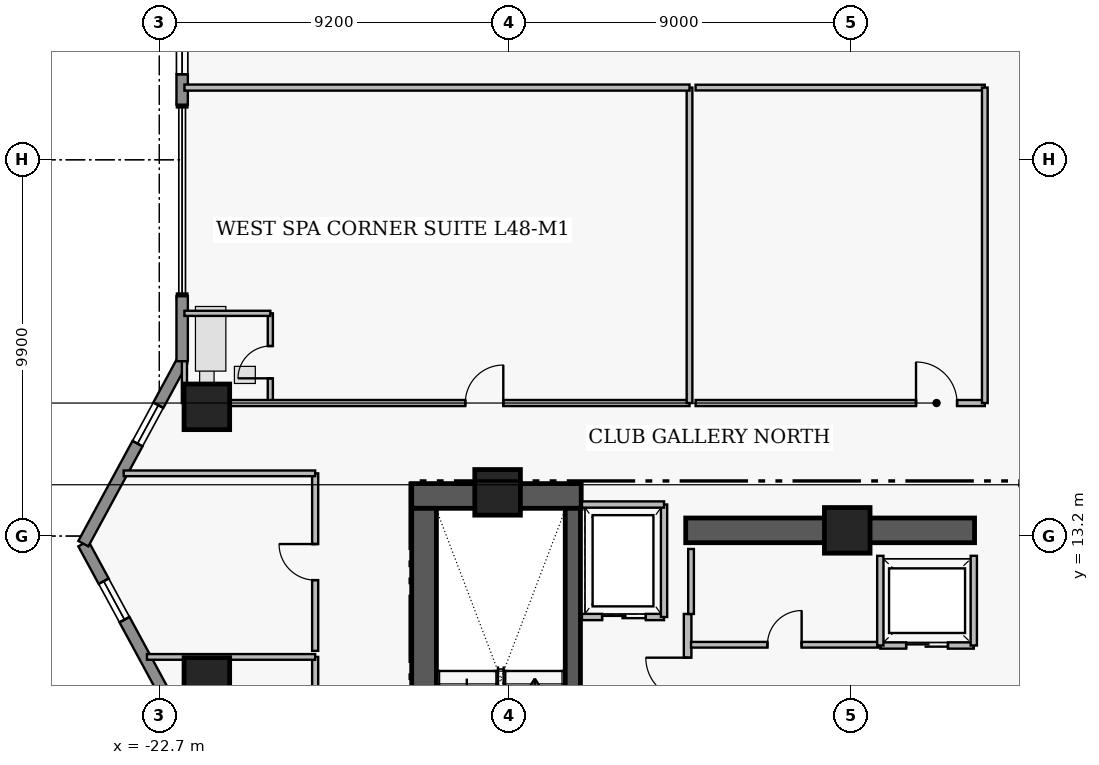
"""IFC4 building model, lengths in metres.
Left out: names, types, materials, properties, quantities, classifications, styles, units other than length and angle.
Written with IfcOpenShell. Run it as: python <this file> out.ifc"""

import sys

from ifc_helpers import new_model, si_unit, direction, frame, frame_2d, origin, origin_2d, place, context, subcontext, project, spatial, rectangle, extrude, element, fill, save


model = new_model("IFC4")
c1 = context("Model", 3, precision=1e-05, world=origin(), true_north=direction((0.0, 1.0)))
c2 = subcontext(c1, "Body", "Model", "MODEL_VIEW")
j1 = project(units=[si_unit("LENGTHUNIT", "METRE"), si_unit("PLANEANGLEUNIT", "RADIAN")], contexts=[c1])
p1 = place(None, origin())
s1 = spatial("IfcSite", under=j1, at=p1, CompositionType="ELEMENT")
p2 = place(p1, origin())
s2 = spatial("IfcBuilding", under=s1, at=p2, CompositionType="ELEMENT")
p3 = place(p2, frame((0.0, 0.0, 192.4)))
s3 = spatial("IfcBuildingStorey", under=s2, at=p3, CompositionType="ELEMENT", Elevation=192.4)
p4 = place(p3, frame((-16.06, 14.255, 0.0), z_axis=(0.0, 0.0, 1.0), x_axis=(1.0, 0.0, 0.0)))
e1 = element("IfcWall", 1, at=p4, inside=s3, PredefinedType="SHEAR", context=c2, shape_type="SweptSolid", body=[
    extrude(rectangle(XDim=4.46, YDim=0.65, at=frame_2d((2.23, 0.0))), origin(), (0.0, 0.0, 1.0), 3.56),
])
p5 = place(p3, frame((-15.735, 4.97, 0.0), z_axis=(0.0, 0.0, 1.0), x_axis=(0.0, 1.0, 0.0)))
e2 = element("IfcWall", 2, at=p5, inside=s3, PredefinedType="SHEAR", context=c2, shape_type="SweptSolid", body=[
    extrude(rectangle(XDim=8.96, YDim=0.65, at=frame_2d((4.48, 0.0))), origin(), (0.0, 0.0, 1.0), 3.56),
])
p6 = place(p3, frame((-8.85, 13.35, 0.0), z_axis=(0.0, 0.0, 1.0), x_axis=(1.0, 0.0, 0.0)))
e3 = element("IfcWall", 3, at=p6, inside=s3, PredefinedType="SHEAR", context=c2, shape_type="SweptSolid", body=[
    extrude(rectangle(XDim=7.6, YDim=0.65, at=frame_2d((3.8, 0.0))), origin(), (0.0, 0.0, 1.0), 3.53),
])
p7 = place(p3, frame((-11.82, 4.97, 0.0), z_axis=(0.0, 0.0, 1.0), x_axis=(0.0, 1.0, 0.0)))
e4 = element("IfcWall", 4, at=p7, inside=s3, PredefinedType="SHEAR", context=c2, shape_type="SweptSolid", body=[
    extrude(rectangle(XDim=8.96, YDim=0.4, at=frame_2d((4.48, 0.0))), origin(), (0.0, 0.0, 1.0), 3.56),
])
p8 = place(p7, frame((0.31, 0.0, 0.0)))
e5 = element("IfcOpeningElement", 5, at=p8, cuts=e4, PredefinedType="OPENING", context=c2, shape_type="SweptSolid", body=[
    extrude(rectangle(XDim=1.12, YDim=2.22, at=frame_2d((0.56, 1.11))), frame((0.0, 0.21, 0.0), z_axis=(0.0, -1.0, 0.0), x_axis=(1.0, 0.0, 0.0)), (0.0, 0.0, 1.0), 0.42),
])
for number, where, z_axis, x_axis in (
    (6, (-13.8, 14.35, 0.0), (0.0, 0.0, 1.0), (1.0, 0.0, 0.0)),
    (7, (-4.6, 13.35, 0.0), (0.0, 0.0, 1.0), (1.0, 0.0, 0.0)),
    (8, (-21.45, 9.4, 0.0), (0.0, 0.0, 1.0), (1.0, 0.0, 0.0)),
    (9, (-21.45, 16.6, 0.0), (0.0, 0.0, 1.0), (1.0, 0.0, 0.0)),
):
    element("IfcColumn", number, at=place(p3, frame(where, z_axis=z_axis, x_axis=x_axis)), inside=s3, PredefinedType="COLUMN", context=c2, shape_type="SweptSolid", body=[
        extrude(rectangle(XDim=1.2, YDim=1.2, at=origin_2d()), origin(), (0.0, 0.0, 1.0), 3.75),
    ])
p9 = place(p3, frame((-22.1, 8.2, 0.0), z_axis=(0.0, 0.0, 1.0), x_axis=(-0.476258655584, 0.879305233114, 0.0)))
e10 = element("IfcWall", 10, at=p9, inside=s3, PredefinedType="STANDARD", context=c2, shape_type="SweptSolid", body=[
    extrude(rectangle(XDim=5.459, YDim=0.3, at=frame_2d((2.729, 0.0))), origin(), (0.0, 0.0, 1.0), 3.53),
])
p10 = place(p9, frame((3.185, 0.0, 1.25)))
e11 = element("IfcOpeningElement", 11, at=p10, cuts=e10, PredefinedType="OPENING", context=c2, shape_type="SweptSolid", body=[
    extrude(rectangle(XDim=1.15, YDim=1.55, at=frame_2d((0.575, 0.775))), frame((0.0, 0.16, 0.0), z_axis=(0.0, -1.0, 0.0), x_axis=(1.0, 0.0, 0.0)), (0.0, 0.0, 1.0), 0.32),
])
p11 = place(p3, frame((-24.7, 13.0, 0.0), z_axis=(0.0, 0.0, 1.0), x_axis=(0.476258655584, 0.879305233114, 0.0)))
e12 = element("IfcWall", 12, at=p11, inside=s3, PredefinedType="STANDARD", context=c2, shape_type="SweptSolid", body=[
    extrude(rectangle(XDim=5.459, YDim=0.3, at=frame_2d((2.729, 0.0))), origin(), (0.0, 0.0, 1.0), 3.53),
])
p12 = place(p11, frame((2.993, 0.0, 1.25)))
e13 = element("IfcOpeningElement", 13, at=p12, cuts=e12, PredefinedType="OPENING", context=c2, shape_type="SweptSolid", body=[
    extrude(rectangle(XDim=1.15, YDim=1.55, at=frame_2d((0.575, 0.775))), frame((0.0, 0.16, 0.0), z_axis=(0.0, -1.0, 0.0), x_axis=(1.0, 0.0, 0.0)), (0.0, 0.0, 1.0), 0.32),
])
p13 = place(p3, frame((-22.1, 17.8, 0.0), z_axis=(0.0, 0.0, 1.0), x_axis=(0.0, 1.0, 0.0)))
e14 = element("IfcWall", 14, at=p13, inside=s3, PredefinedType="STANDARD", context=c2, shape_type="SweptSolid", body=[
    extrude(rectangle(XDim=1.71, YDim=0.3, at=frame_2d((0.855, 0.0))), origin(), (0.0, 0.0, 1.0), 3.53),
])
p14 = place(p3, frame((-22.1, 24.55, 0.0), z_axis=(0.0, 0.0, 1.0), x_axis=(0.0, 1.0, 0.0)))
e15 = element("IfcWall", 15, at=p14, inside=s3, PredefinedType="STANDARD", context=c2, shape_type="SweptSolid", body=[
    extrude(rectangle(XDim=5.65, YDim=0.3, at=frame_2d((2.825, 0.0))), origin(), (0.0, 0.0, 1.0), 3.53),
])
p15 = place(p14, frame((0.8, 0.0, 0.95)))
e16 = element("IfcOpeningElement", 16, at=p15, cuts=e15, PredefinedType="OPENING", context=c2, shape_type="SweptSolid", body=[
    extrude(rectangle(XDim=1.15, YDim=1.55, at=frame_2d((0.575, 0.775))), frame((0.0, 0.16, 0.0), z_axis=(0.0, -1.0, 0.0), x_axis=(1.0, 0.0, 0.0)), (0.0, 0.0, 1.0), 0.32),
])
p16 = place(p14, frame((2.905, 0.0, 0.95)))
e17 = element("IfcOpeningElement", 17, at=p16, cuts=e15, PredefinedType="OPENING", context=c2, shape_type="SweptSolid", body=[
    extrude(rectangle(XDim=1.15, YDim=1.55, at=frame_2d((0.575, 0.775))), frame((0.0, 0.16, 0.0), z_axis=(0.0, -1.0, 0.0), x_axis=(1.0, 0.0, 0.0)), (0.0, 0.0, 1.0), 0.32),
])
p17 = place(p3, frame((-8.8, 5.05, 0.0), z_axis=(0.0, 0.0, 1.0), x_axis=(0.0, 1.0, 0.0)))
e18 = element("IfcWall", 18, at=p17, inside=s3, PredefinedType="PARTITIONING", context=c2, shape_type="SweptSolid", body=[
    extrude(rectangle(XDim=6.1, YDim=0.2, at=frame_2d((3.05, 0.0))), origin(), (0.0, 0.0, 1.0), 3.53),
])
p18 = place(p17, frame((0.25, 0.0, 0.0)))
e19 = element("IfcOpeningElement", 19, at=p18, cuts=e18, PredefinedType="OPENING", context=c2, shape_type="SweptSolid", body=[
    extrude(rectangle(XDim=1.1, YDim=2.2, at=frame_2d((0.55, 1.1))), frame((0.0, 0.11, 0.0), z_axis=(0.0, -1.0, 0.0), x_axis=(1.0, 0.0, 0.0)), (0.0, 0.0, 1.0), 0.22),
])
p19 = place(p17, frame((3.85, 0.0, 0.0)))
e20 = element("IfcOpeningElement", 20, at=p19, cuts=e18, PredefinedType="OPENING", context=c2, shape_type="SweptSolid", body=[
    extrude(rectangle(XDim=1.1, YDim=2.2, at=frame_2d((0.55, 1.1))), frame((0.0, 0.11, 0.0), z_axis=(0.0, -1.0, 0.0), x_axis=(1.0, 0.0, 0.0)), (0.0, 0.0, 1.0), 0.22),
])
p20 = place(p3, frame((-11.58, 11.07, 0.0), z_axis=(0.0, 0.0, 1.0), x_axis=(1.0, 0.0, 0.0)))
e21 = element("IfcWall", 21, at=p20, inside=s3, PredefinedType="PARTITIONING", context=c2, shape_type="SweptSolid", body=[
    extrude(rectangle(XDim=2.16, YDim=0.165, at=frame_2d((1.08, 0.0))), origin(), (0.0, 0.0, 1.0), 3.53),
])
p21 = place(p20, frame((0.53, 0.0, 0.0)))
e22 = element("IfcOpeningElement", 22, at=p21, cuts=e21, PredefinedType="OPENING", context=c2, shape_type="SweptSolid", body=[
    extrude(rectangle(XDim=1.15, YDim=2.25, at=frame_2d((0.575, 1.125))), frame((0.0, 0.093, 0.0), z_axis=(0.0, -1.0, 0.0), x_axis=(1.0, 0.0, 0.0)), (0.0, 0.0, 1.0), 0.185),
])
p22 = place(p3, frame((-3.73, 10.32, 0.0), z_axis=(0.0, 0.0, 1.0), x_axis=(1.0, 0.0, 0.0)))
e23 = element("IfcWall", 23, at=p22, inside=s3, PredefinedType="PARTITIONING", context=c2, shape_type="SweptSolid", body=[
    extrude(rectangle(XDim=2.46, YDim=0.165, at=frame_2d((1.23, 0.0))), origin(), (0.0, 0.0, 1.0), 3.53),
])
p23 = place(p22, frame((0.68, 0.0, 0.0)))
e24 = element("IfcOpeningElement", 24, at=p23, cuts=e23, PredefinedType="OPENING", context=c2, shape_type="SweptSolid", body=[
    extrude(rectangle(XDim=1.1, YDim=2.25, at=frame_2d((0.55, 1.125))), frame((0.0, 0.093, 0.0), z_axis=(0.0, -1.0, 0.0), x_axis=(1.0, 0.0, 0.0)), (0.0, 0.0, 1.0), 0.185),
])
p24 = place(p3, frame((-8.71, 10.34, 0.0), z_axis=(0.0, 0.0, 1.0), x_axis=(1.0, 0.0, 0.0)))
e25 = element("IfcWall", 25, at=p24, inside=s3, PredefinedType="PARTITIONING", context=c2, shape_type="SweptSolid", body=[
    extrude(rectangle(XDim=4.92, YDim=0.15, at=frame_2d((2.46, 0.0))), origin(), (0.0, 0.0, 1.0), 3.53),
])
p25 = place(p24, frame((2.01, 0.0, 0.0)))
e26 = element("IfcOpeningElement", 26, at=p25, cuts=e25, PredefinedType="OPENING", context=c2, shape_type="SweptSolid", body=[
    extrude(rectangle(XDim=0.9, YDim=2.15, at=frame_2d((0.45, 1.075))), frame((0.0, 0.085, 0.0), z_axis=(0.0, -1.0, 0.0), x_axis=(1.0, 0.0, 0.0)), (0.0, 0.0, 1.0), 0.17),
])
p26 = place(p3, frame((-19.78, 16.7, 0.0), z_axis=(0.0, 0.0, 1.0), x_axis=(0.0, 1.0, 0.0)))
e27 = element("IfcWall", 27, at=p26, inside=s3, PredefinedType="PLUMBINGWALL", context=c2, shape_type="SweptSolid", body=[
    extrude(rectangle(XDim=2.36, YDim=0.135, at=frame_2d((1.18, 0.0))), origin(), (0.0, 0.0, 1.0), 3.53),
])
p27 = place(p26, frame((0.65, 0.0, 0.0)))
e28 = element("IfcOpeningElement", 28, at=p27, cuts=e27, PredefinedType="OPENING", context=c2, shape_type="SweptSolid", body=[
    extrude(rectangle(XDim=0.85, YDim=2.1, at=frame_2d((0.425, 1.05))), frame((0.0, 0.077, 0.0), z_axis=(0.0, -1.0, 0.0), x_axis=(1.0, 0.0, 0.0)), (0.0, 0.0, 1.0), 0.155),
])
p28 = place(p3, frame((-22.04, 16.7, 0.0), z_axis=(0.0, 0.0, 1.0), x_axis=(1.0, 0.0, 0.0)))
e29 = element("IfcWall", 29, at=p28, inside=s3, PredefinedType="PARTITIONING", context=c2, shape_type="SweptSolid", body=[
    extrude(rectangle(XDim=13.29, YDim=0.16, at=frame_2d((6.645, 0.0))), origin(), (0.0, 0.0, 1.0), 3.124),
])
p29 = place(p28, frame((7.39, 0.0, 0.0)))
e30 = element("IfcOpeningElement", 30, at=p29, cuts=e29, PredefinedType="OPENING", context=c2, shape_type="SweptSolid", body=[
    extrude(rectangle(XDim=1.0, YDim=2.15, at=frame_2d((0.5, 1.075))), frame((0.0, 0.09, 0.0), z_axis=(0.0, -1.0, 0.0), x_axis=(1.0, 0.0, 0.0)), (0.0, 0.0, 1.0), 0.18),
])
p30 = place(p3, frame((-8.59, 16.7, 0.0), z_axis=(0.0, 0.0, 1.0), x_axis=(1.0, 0.0, 0.0)))
e31 = element("IfcWall", 31, at=p30, inside=s3, PredefinedType="PARTITIONING", context=c2, shape_type="SweptSolid", body=[
    extrude(rectangle(XDim=7.61, YDim=0.16, at=frame_2d((3.805, 0.0))), origin(), (0.0, 0.0, 1.0), 3.124),
])
p31 = place(p30, frame((5.8, 0.0, 0.0)))
e32 = element("IfcOpeningElement", 32, at=p31, cuts=e31, PredefinedType="OPENING", context=c2, shape_type="SweptSolid", body=[
    extrude(rectangle(XDim=1.08, YDim=2.18, at=frame_2d((0.54, 1.09))), frame((0.0, 0.09, 0.0), z_axis=(0.0, -1.0, 0.0), x_axis=(1.0, 0.0, 0.0)), (0.0, 0.0, 1.0), 0.18),
])
p32 = place(p3, frame((-18.6, 6.91, 0.0), z_axis=(0.0, 0.0, 1.0), x_axis=(0.0, 1.0, 0.0)))
e33 = element("IfcWall", 33, at=p32, inside=s3, PredefinedType="PARTITIONING", context=c2, shape_type="SweptSolid", body=[
    extrude(rectangle(XDim=3.11, YDim=0.16, at=frame_2d((1.555, 0.0))), origin(), (0.0, 0.0, 1.0), 3.53),
])
p33 = place(p32, frame((1.08, 0.0, 0.0)))
e34 = element("IfcOpeningElement", 34, at=p33, cuts=e33, PredefinedType="OPENING", context=c2, shape_type="SweptSolid", body=[
    extrude(rectangle(XDim=0.95, YDim=2.15, at=frame_2d((0.475, 1.075))), frame((0.0, 0.09, 0.0), z_axis=(0.0, -1.0, 0.0), x_axis=(1.0, 0.0, 0.0)), (0.0, 0.0, 1.0), 0.18),
])
p34 = place(p3, frame((-18.6, 10.18, 0.0), z_axis=(0.0, 0.0, 1.0), x_axis=(0.0, 1.0, 0.0)))
e35 = element("IfcWall", 35, at=p34, inside=s3, PredefinedType="PARTITIONING", context=c2, shape_type="SweptSolid", body=[
    extrude(rectangle(XDim=4.67, YDim=0.16, at=frame_2d((2.335, 0.0))), origin(), (0.0, 0.0, 1.0), 3.53),
])
p35 = place(p34, frame((1.86, 0.0, 0.0)))
e36 = element("IfcOpeningElement", 36, at=p35, cuts=e35, PredefinedType="OPENING", context=c2, shape_type="SweptSolid", body=[
    extrude(rectangle(XDim=0.95, YDim=2.15, at=frame_2d((0.475, 1.075))), frame((0.0, 0.09, 0.0), z_axis=(0.0, -1.0, 0.0), x_axis=(1.0, 0.0, 0.0)), (0.0, 0.0, 1.0), 0.18),
])
p36 = place(p3, frame((-9.42, 11.07, 0.0), z_axis=(0.0, 0.0, 1.0), x_axis=(0.0, 1.0, 0.0)))
e37 = element("IfcWall", 37, at=p36, inside=s3, PredefinedType="PARTITIONING", context=c2, shape_type="SweptSolid", body=[
    extrude(rectangle(XDim=2.96, YDim=0.165, at=frame_2d((1.48, 0.0))), origin(), (0.0, 0.0, 1.0), 3.53),
])
p37 = place(p3, frame((-11.58, 14.03, 0.0), z_axis=(0.0, 0.0, 1.0), x_axis=(1.0, 0.0, 0.0)))
e38 = element("IfcWall", 38, at=p37, inside=s3, PredefinedType="PARTITIONING", context=c2, shape_type="SweptSolid", body=[
    extrude(rectangle(XDim=2.16, YDim=0.165, at=frame_2d((1.08, 0.0))), origin(), (0.0, 0.0, 1.0), 3.53),
])
for number, where, z_axis, x_axis in (
    (39, (-3.73, 10.32, 0.0), (0.0, 0.0, 1.0), (0.0, 1.0, 0.0)),
    (40, (-1.27, 10.32, 0.0), (0.0, 0.0, 1.0), (0.0, 1.0, 0.0)),
):
    element("IfcWall", number, at=place(p3, frame(where, z_axis=z_axis, x_axis=x_axis)), inside=s3, PredefinedType="PARTITIONING", context=c2, shape_type="SweptSolid", body=[
        extrude(rectangle(XDim=2.36, YDim=0.165, at=frame_2d((1.18, 0.0))), origin(), (0.0, 0.0, 1.0), 3.53),
    ])
p38 = place(p3, frame((-8.71, 11.15, 0.0), z_axis=(0.0, 0.0, 1.0), x_axis=(0.0, 1.0, 0.0)))
e41 = element("IfcWall", 41, at=p38, inside=s3, PredefinedType="PARTITIONING", context=c2, shape_type="SweptSolid", body=[
    extrude(rectangle(XDim=1.71, YDim=0.15, at=frame_2d((0.855, 0.0))), origin(), (0.0, 0.0, 1.0), 3.53),
])
p39 = place(p3, frame((-22.04, 19.06, 0.0), z_axis=(0.0, 0.0, 1.0), x_axis=(1.0, 0.0, 0.0)))
e42 = element("IfcWall", 42, at=p39, inside=s3, PredefinedType="PLUMBINGWALL", context=c2, shape_type="SweptSolid", body=[
    extrude(rectangle(XDim=2.26, YDim=0.135, at=frame_2d((1.13, 0.0))), origin(), (0.0, 0.0, 1.0), 3.53),
])
p40 = place(p3, frame((-22.04, 16.7, 0.0), z_axis=(0.0, 0.0, 1.0), x_axis=(0.0, 1.0, 0.0)))
e43 = element("IfcWall", 43, at=p40, inside=s3, PredefinedType="PLUMBINGWALL", context=c2, shape_type="SweptSolid", body=[
    extrude(rectangle(XDim=1.1, YDim=0.135, at=frame_2d((0.55, 0.0))), origin(), (0.0, 0.0, 1.0), 3.53),
])
p41 = place(p3, frame((-8.75, 16.7, 0.0), z_axis=(0.0, 0.0, 1.0), x_axis=(0.0, 1.0, 0.0)))
e44 = element("IfcWall", 44, at=p41, inside=s3, PredefinedType="PARTITIONING", context=c2, shape_type="SweptSolid", body=[
    extrude(rectangle(XDim=8.3, YDim=0.15, at=frame_2d((4.15, 0.0))), origin(), (0.0, 0.0, 1.0), 3.53),
])
p42 = place(p3, frame((-22.04, 25.0, 0.0), z_axis=(0.0, 0.0, 1.0), x_axis=(1.0, 0.0, 0.0)))
e45 = element("IfcWall", 45, at=p42, inside=s3, PredefinedType="PARTITIONING", context=c2, shape_type="SweptSolid", body=[
    extrude(rectangle(XDim=13.29, YDim=0.16, at=frame_2d((6.645, 0.0))), origin(), (0.0, 0.0, 1.0), 3.124),
])
p43 = place(p3, frame((-8.59, 25.0, 0.0), z_axis=(0.0, 0.0, 1.0), x_axis=(1.0, 0.0, 0.0)))
e46 = element("IfcWall", 46, at=p43, inside=s3, PredefinedType="PARTITIONING", context=c2, shape_type="SweptSolid", body=[
    extrude(rectangle(XDim=7.61, YDim=0.15, at=frame_2d((3.805, 0.0))), origin(), (0.0, 0.0, 1.0), 3.124),
])
p44 = place(p3, frame((-0.98, 16.7, 0.0), z_axis=(0.0, 0.0, 1.0), x_axis=(0.0, 1.0, 0.0)))
e47 = element("IfcWall", 47, at=p44, inside=s3, PredefinedType="PARTITIONING", context=c2, shape_type="SweptSolid", body=[
    extrude(rectangle(XDim=8.3, YDim=0.15, at=frame_2d((4.15, 0.0))), origin(), (0.0, 0.0, 1.0), 3.53),
])
p45 = place(p3, frame((-23.026, 10.02, 0.0), z_axis=(0.0, 0.0, 1.0), x_axis=(1.0, 0.0, 0.0)))
e48 = element("IfcWall", 48, at=p45, inside=s3, PredefinedType="PARTITIONING", context=c2, shape_type="SweptSolid", body=[
    extrude(rectangle(XDim=4.426, YDim=0.15, at=frame_2d((2.213, 0.0))), origin(), (0.0, 0.0, 1.0), 3.53),
])
p46 = place(p3, frame((-23.638, 14.85, 0.0), z_axis=(0.0, 0.0, 1.0), x_axis=(1.0, 0.0, 0.0)))
e49 = element("IfcWall", 49, at=p46, inside=s3, PredefinedType="PARTITIONING", context=c2, shape_type="SweptSolid", body=[
    extrude(rectangle(XDim=5.038, YDim=0.15, at=frame_2d((2.519, 0.0))), origin(), (0.0, 0.0, 1.0), 3.53),
])
p47 = place(p10, origin())
e50 = element("IfcWindow", 50, at=p47, inside=s3, PartitioningType="SINGLE_PANEL", PredefinedType="WINDOW", context=c2, shape_type="SweptSolid", body=[
    extrude(rectangle(XDim=1.15, YDim=1.55, at=frame_2d((0.575, 0.775))), frame((0.0, 0.03, 0.0), z_axis=(0.0, -1.0, 0.0), x_axis=(1.0, 0.0, 0.0)), (0.0, 0.0, 1.0), 0.06),
])
fill(e11, e50)
p48 = place(p12, origin())
e51 = element("IfcWindow", 51, at=p48, inside=s3, PartitioningType="SINGLE_PANEL", PredefinedType="WINDOW", context=c2, shape_type="SweptSolid", body=[
    extrude(rectangle(XDim=1.15, YDim=1.55, at=frame_2d((0.575, 0.775))), frame((0.0, 0.03, 0.0), z_axis=(0.0, -1.0, 0.0), x_axis=(1.0, 0.0, 0.0)), (0.0, 0.0, 1.0), 0.06),
])
fill(e13, e51)
p49 = place(p15, origin())
e52 = element("IfcWindow", 52, at=p49, inside=s3, PartitioningType="SINGLE_PANEL", PredefinedType="WINDOW", context=c2, shape_type="SweptSolid", body=[
    extrude(rectangle(XDim=1.15, YDim=1.55, at=frame_2d((0.575, 0.775))), frame((0.0, 0.03, 0.0), z_axis=(0.0, -1.0, 0.0), x_axis=(1.0, 0.0, 0.0)), (0.0, 0.0, 1.0), 0.06),
])
fill(e16, e52)
p50 = place(p19, origin())
e53 = element("IfcDoor", 53, at=p50, inside=s3, OperationType="SINGLE_SWING_RIGHT", PredefinedType="DOOR", context=c2, shape_type="SweptSolid", body=[
    extrude(rectangle(XDim=1.1, YDim=2.2, at=frame_2d((0.55, 1.1))), frame((0.0, 0.025, 0.0), z_axis=(0.0, -1.0, 0.0), x_axis=(1.0, 0.0, 0.0)), (0.0, 0.0, 1.0), 0.05),
])
fill(e20, e53)
p51 = place(p21, origin())
e54 = element("IfcDoor", 54, at=p51, inside=s3, OperationType="SLIDING_TO_LEFT", PredefinedType="DOOR", context=c2, shape_type="SweptSolid", body=[
    extrude(rectangle(XDim=1.15, YDim=2.25, at=frame_2d((0.575, 1.125))), frame((0.0, 0.025, 0.0), z_axis=(0.0, -1.0, 0.0), x_axis=(1.0, 0.0, 0.0)), (0.0, 0.0, 1.0), 0.05),
])
fill(e22, e54)
p52 = place(p23, origin())
e55 = element("IfcDoor", 55, at=p52, inside=s3, OperationType="SLIDING_TO_LEFT", PredefinedType="DOOR", context=c2, shape_type="SweptSolid", body=[
    extrude(rectangle(XDim=1.1, YDim=2.25, at=frame_2d((0.55, 1.125))), frame((0.0, 0.025, 0.0), z_axis=(0.0, -1.0, 0.0), x_axis=(1.0, 0.0, 0.0)), (0.0, 0.0, 1.0), 0.05),
])
fill(e24, e55)
p53 = place(p25, origin())
e56 = element("IfcDoor", 56, at=p53, inside=s3, OperationType="SINGLE_SWING_RIGHT", PredefinedType="DOOR", context=c2, shape_type="SweptSolid", body=[
    extrude(rectangle(XDim=0.9, YDim=2.15, at=frame_2d((0.45, 1.075))), frame((0.0, 0.025, 0.0), z_axis=(0.0, -1.0, 0.0), x_axis=(1.0, 0.0, 0.0)), (0.0, 0.0, 1.0), 0.05),
])
fill(e26, e56)
p54 = place(p27, origin())
e57 = element("IfcDoor", 57, at=p54, inside=s3, OperationType="SINGLE_SWING_LEFT", PredefinedType="DOOR", context=c2, shape_type="SweptSolid", body=[
    extrude(rectangle(XDim=0.85, YDim=2.1, at=frame_2d((0.425, 1.05))), frame((0.0, 0.025, 0.0), z_axis=(0.0, -1.0, 0.0), x_axis=(1.0, 0.0, 0.0)), (0.0, 0.0, 1.0), 0.05),
])
fill(e28, e57)
p55 = place(p29, origin())
e58 = element("IfcDoor", 58, at=p55, inside=s3, OperationType="SINGLE_SWING_RIGHT", PredefinedType="DOOR", context=c2, shape_type="SweptSolid", body=[
    extrude(rectangle(XDim=1.0, YDim=2.15, at=frame_2d((0.5, 1.075))), frame((0.0, 0.025, 0.0), z_axis=(0.0, -1.0, 0.0), x_axis=(1.0, 0.0, 0.0)), (0.0, 0.0, 1.0), 0.05),
])
fill(e30, e58)
p56 = place(p31, origin())
e59 = element("IfcDoor", 59, at=p56, inside=s3, OperationType="SINGLE_SWING_LEFT", PredefinedType="DOOR", context=c2, shape_type="SweptSolid", body=[
    extrude(rectangle(XDim=1.08, YDim=2.18, at=frame_2d((0.54, 1.09))), frame((0.0, 0.025, 0.0), z_axis=(0.0, -1.0, 0.0), x_axis=(1.0, 0.0, 0.0)), (0.0, 0.0, 1.0), 0.05),
])
fill(e32, e59)
p57 = place(p35, origin())
e60 = element("IfcDoor", 60, at=p57, inside=s3, OperationType="SINGLE_SWING_RIGHT", PredefinedType="DOOR", context=c2, shape_type="SweptSolid", body=[
    extrude(rectangle(XDim=0.95, YDim=2.15, at=frame_2d((0.475, 1.075))), frame((0.0, 0.025, 0.0), z_axis=(0.0, -1.0, 0.0), x_axis=(1.0, 0.0, 0.0)), (0.0, 0.0, 1.0), 0.05),
])
fill(e36, e60)
save(model, sys.argv[1])
